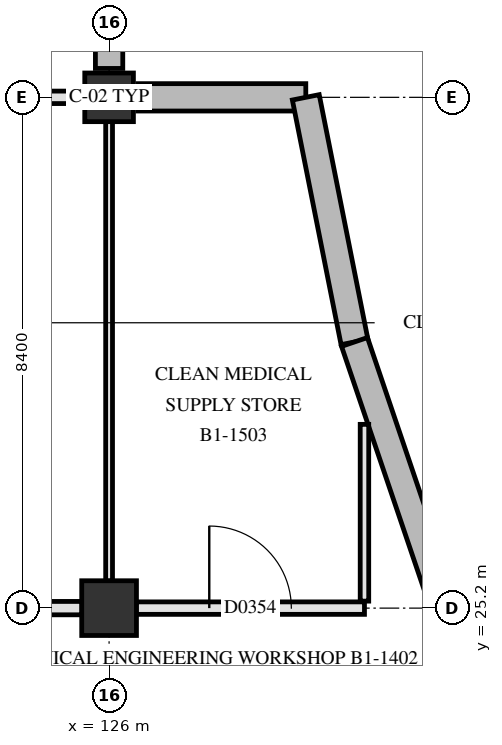
"""IFC4 building model, lengths in metres.
Left out: names, types, materials, properties, quantities, classifications, styles, units other than length and angle.
Written with IfcOpenShell. Run it as: python <this file> out.ifc"""

import sys

from ifc_helpers import new_model, si_unit, direction, frame, frame_2d, origin, origin_2d, place, context, subcontext, project, spatial, rectangle, extrude, element, fill, save


model = new_model("IFC4")
c1 = context("Model", 3, precision=1e-05, world=origin(), true_north=direction((0.0, 1.0)))
c2 = subcontext(c1, "Body", "Model", "MODEL_VIEW")
j1 = project(units=[si_unit("LENGTHUNIT", "METRE"), si_unit("PLANEANGLEUNIT", "RADIAN")], contexts=[c1])
p1 = place(None, origin())
s1 = spatial("IfcSite", under=j1, at=p1, CompositionType="ELEMENT")
p2 = place(p1, origin())
s2 = spatial("IfcBuilding", under=s1, at=p2, CompositionType="ELEMENT")
p3 = place(p2, frame((0.0, 0.0, -5.4)))
s3 = spatial("IfcBuildingStorey", under=s2, at=p3, CompositionType="ELEMENT", Elevation=-5.4)
p4 = place(p3, frame((126.0, 25.2, 0.0), z_axis=(0.0, 0.0, 1.0), x_axis=(1.0, 0.0, 0.0)))
e1 = element("IfcColumn", 1, at=p4, inside=s3, PredefinedType="COLUMN", context=c2, shape_type="SweptSolid", body=[
    extrude(rectangle(XDim=0.9, YDim=0.9, at=origin_2d()), origin(), (0.0, 0.0, 1.0), 5.4),
])
p5 = place(p3, frame((126.0, 33.6, 0.0), z_axis=(0.0, 0.0, 1.0), x_axis=(1.0, 0.0, 0.0)))
e2 = element("IfcColumn", 2, at=p5, inside=s3, PredefinedType="COLUMN", context=c2, shape_type="SweptSolid", body=[
    extrude(rectangle(XDim=0.8, YDim=0.8, at=origin_2d()), origin(), (0.0, 0.0, 1.0), 5.4),
])
p6 = place(p3, frame((126.0, 41.525, 0.0), z_axis=(0.0, 0.0, 1.0), x_axis=(0.0, -1.0, 0.0)))
e3 = element("IfcWall", 3, at=p6, inside=s3, PredefinedType="SOLIDWALL", context=c2, shape_type="SweptSolid", body=[
    extrude(rectangle(XDim=7.45, YDim=0.45, at=frame_2d((3.725, 0.0))), origin(), (0.0, 0.0, 1.0), 5.08),
])
p7 = place(p3, frame((126.475, 33.6, 0.0), z_axis=(0.0, 0.0, 1.0), x_axis=(1.0, 0.0, 0.0)))
e4 = element("IfcWall", 4, at=p7, inside=s3, PredefinedType="SOLIDWALL", context=c2, shape_type="SweptSolid", body=[
    extrude(rectangle(XDim=2.76, YDim=0.45, at=frame_2d((1.38, 0.0))), origin(), (0.0, 0.0, 1.0), 5.08),
])
p8 = place(p3, frame((129.235, 33.6, 0.0), z_axis=(0.0, 0.0, 1.0), x_axis=(0.195211869209, -0.980761095334, 0.0)))
e5 = element("IfcWall", 5, at=p8, inside=s3, PredefinedType="SOLIDWALL", context=c2, shape_type="SweptSolid", body=[
    extrude(rectangle(XDim=4.102, YDim=0.45, at=frame_2d((2.051, 0.0))), origin(), (0.0, 0.0, 1.0), 5.08),
])
p9 = place(p3, frame((130.036, 29.577, 0.0), z_axis=(0.0, 0.0, 1.0), x_axis=(0.321309878482, -0.946974108405, 0.0)))
e6 = element("IfcWall", 6, at=p9, inside=s3, PredefinedType="SOLIDWALL", context=c2, shape_type="SweptSolid", body=[
    extrude(rectangle(XDim=4.622, YDim=0.45, at=frame_2d((2.311, 0.0))), origin(), (0.0, 0.0, 1.0), 5.08),
])
p10 = place(p3, frame((121.8, 25.2, 0.0), z_axis=(0.0, 0.0, 1.0), x_axis=(1.0, 0.0, 0.0)))
e7 = element("IfcWall", 7, at=p10, inside=s3, PredefinedType="PARTITIONING", context=c2, shape_type="SweptSolid", body=[
    extrude(rectangle(XDim=3.755, YDim=0.22, at=frame_2d((1.877, 0.0))), origin(), (0.0, 0.0, 1.0), 4.42),
])
p11 = place(p10, frame((1.137, 0.0, 0.0)))
e8 = element("IfcOpeningElement", 8, at=p11, cuts=e7, PredefinedType="OPENING", context=c2, shape_type="SweptSolid", body=[
    extrude(rectangle(XDim=1.48, YDim=2.22, at=frame_2d((0.74, 1.11))), frame((0.0, 0.12, 0.0), z_axis=(0.0, -1.0, 0.0), x_axis=(1.0, 0.0, 0.0)), (0.0, 0.0, 1.0), 0.24),
])
p12 = place(p3, frame((126.445, 25.2, 0.0), z_axis=(0.0, 0.0, 1.0), x_axis=(1.0, 0.0, 0.0)))
e9 = element("IfcWall", 9, at=p12, inside=s3, PredefinedType="PARTITIONING", context=c2, shape_type="SweptSolid", body=[
    extrude(rectangle(XDim=3.755, YDim=0.205, at=frame_2d((1.877, 0.0))), origin(), (0.0, 0.0, 1.0), 4.42),
])
p13 = place(p12, frame((1.202, 0.0, 0.0)))
e10 = element("IfcOpeningElement", 10, at=p13, cuts=e9, PredefinedType="OPENING", context=c2, shape_type="SweptSolid", body=[
    extrude(rectangle(XDim=1.35, YDim=2.2, at=frame_2d((0.675, 1.1))), frame((0.0, 0.113, 0.0), z_axis=(0.0, -1.0, 0.0), x_axis=(1.0, 0.0, 0.0)), (0.0, 0.0, 1.0), 0.225),
])
p14 = place(p3, frame((121.8, 33.6, 0.0), z_axis=(0.0, 0.0, 1.0), x_axis=(1.0, 0.0, 0.0)))
e11 = element("IfcWall", 11, at=p14, inside=s3, PredefinedType="PARTITIONING", context=c2, shape_type="SweptSolid", body=[
    extrude(rectangle(XDim=3.805, YDim=0.205, at=frame_2d((1.902, 0.0))), origin(), (0.0, 0.0, 1.0), 4.42),
])
p15 = place(p3, frame((126.0, 25.645, 0.0), z_axis=(0.0, 0.0, 1.0), x_axis=(0.0, 1.0, 0.0)))
e12 = element("IfcWall", 12, at=p15, inside=s3, PredefinedType="PARTITIONING", context=c2, shape_type="SweptSolid", body=[
    extrude(rectangle(XDim=7.56, YDim=0.112, at=frame_2d((3.78, 0.0))), origin(), (0.0, 0.0, 1.0), 4.47),
])
p16 = place(p3, frame((130.2, 25.315, 0.0), z_axis=(0.0, 0.0, 1.0), x_axis=(0.0, 1.0, 0.0)))
e13 = element("IfcWall", 13, at=p16, inside=s3, PredefinedType="PARTITIONING", context=c2, shape_type="SweptSolid", body=[
    extrude(rectangle(XDim=2.907, YDim=0.14, at=frame_2d((1.454, 0.0))), origin(), (0.0, 0.0, 1.0), 4.42),
])
p17 = place(p13, origin())
e14 = element("IfcDoor", 14, at=p17, inside=s3, OperationType="SINGLE_SWING_LEFT", PredefinedType="DOOR", context=c2, shape_type="SweptSolid", body=[
    extrude(rectangle(XDim=1.35, YDim=2.2, at=frame_2d((0.675, 1.1))), frame((0.0, 0.025, 0.0), z_axis=(0.0, -1.0, 0.0), x_axis=(1.0, 0.0, 0.0)), (0.0, 0.0, 1.0), 0.05),
])
fill(e10, e14)
save(model, sys.argv[1])
